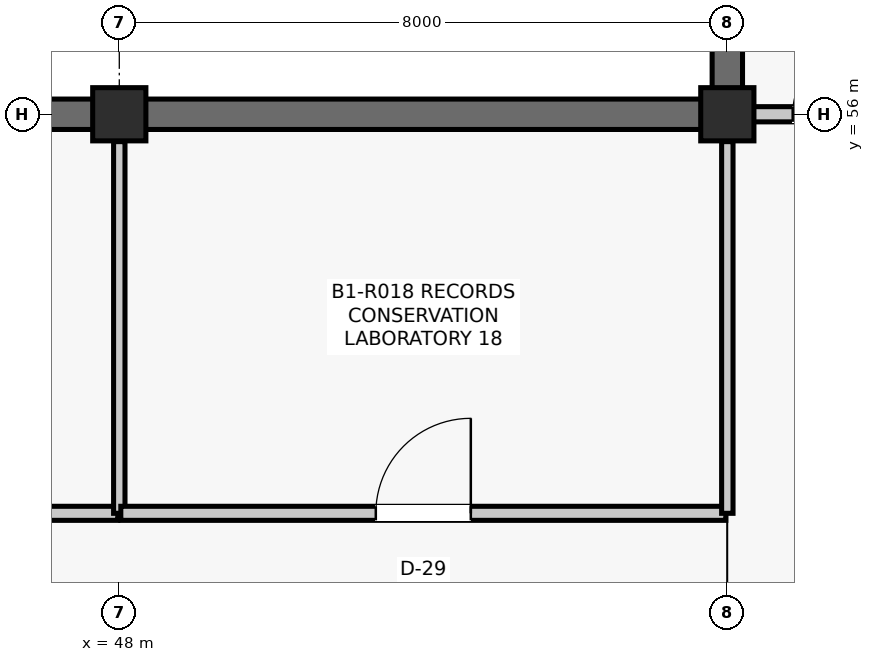
"""IFC4 building model, lengths in metres.
Left out: names, types, materials, properties, quantities, classifications, styles, units other than length and angle.
Written with IfcOpenShell. Run it as: python <this file> out.ifc"""

import sys

from ifc_helpers import new_model, si_unit, direction, frame, frame_2d, origin, origin_2d, place, context, subcontext, project, spatial, rectangle, extrude, element, fill, save


model = new_model("IFC4")
c1 = context("Model", 3, precision=1e-05, world=origin(), true_north=direction((0.0, 1.0)))
c2 = subcontext(c1, "Body", "Model", "MODEL_VIEW")
j1 = project(units=[si_unit("LENGTHUNIT", "METRE"), si_unit("PLANEANGLEUNIT", "RADIAN")], contexts=[c1])
p1 = place(None, origin())
s1 = spatial("IfcSite", under=j1, at=p1, CompositionType="ELEMENT")
p2 = place(p1, origin())
s2 = spatial("IfcBuilding", under=s1, at=p2, CompositionType="ELEMENT")
p3 = place(p2, frame((0.0, 0.0, -4.29)))
s3 = spatial("IfcBuildingStorey", under=s2, at=p3, CompositionType="ELEMENT", Elevation=-4.29)
for number, where, z_axis, x_axis in (
    (1, (48.0, 56.0, 0.0), (0.0, 0.0, 1.0), (1.0, 0.0, 0.0)),
    (2, (56.0, 56.0, 0.0), (0.0, 0.0, 1.0), (1.0, 0.0, 0.0)),
):
    element("IfcColumn", number, at=place(p3, frame(where, z_axis=z_axis, x_axis=x_axis)), inside=s3, PredefinedType="COLUMN", context=c2, shape_type="SweptSolid", body=[
        extrude(rectangle(XDim=0.7, YDim=0.7, at=origin_2d()), origin(), (0.0, 0.0, 1.0), 4.29),
    ])
p4 = place(p3, frame((40.335, 56.0, 0.0), z_axis=(0.0, 0.0, 1.0), x_axis=(1.0, 0.0, 0.0)))
e3 = element("IfcWall", 3, at=p4, inside=s3, PredefinedType="SHEAR", context=c2, shape_type="SweptSolid", body=[
    extrude(rectangle(XDim=7.33, YDim=0.4, at=frame_2d((3.665, 0.0))), origin(), (0.0, 0.0, 1.0), 3.667),
])
p5 = place(p3, frame((48.335, 56.0, 0.0), z_axis=(0.0, 0.0, 1.0), x_axis=(1.0, 0.0, 0.0)))
e4 = element("IfcWall", 4, at=p5, inside=s3, PredefinedType="SHEAR", context=c2, shape_type="SweptSolid", body=[
    extrude(rectangle(XDim=7.33, YDim=0.4, at=frame_2d((3.665, 0.0))), origin(), (0.0, 0.0, 1.0), 3.6),
])
p6 = place(p3, frame((56.0, 56.335, 0.0), z_axis=(0.0, 0.0, 1.0), x_axis=(0.0, 1.0, 0.0)))
e5 = element("IfcWall", 5, at=p6, inside=s3, PredefinedType="SHEAR", context=c2, shape_type="SweptSolid", body=[
    extrude(rectangle(XDim=7.33, YDim=0.4, at=frame_2d((3.665, 0.0))), origin(), (0.0, 0.0, 1.0), 3.664),
])
p7 = place(p3, frame((40.02, 50.75, 0.0), z_axis=(0.0, 0.0, 1.0), x_axis=(1.0, 0.0, 0.0)))
e6 = element("IfcWall", 6, at=p7, inside=s3, PredefinedType="PARTITIONING", context=c2, shape_type="SweptSolid", body=[
    extrude(rectangle(XDim=7.96, YDim=0.185, at=frame_2d((3.98, 0.0))), origin(), (0.0, 0.0, 1.0), 3.393),
])
p8 = place(p7, frame((3.5, 0.0, 0.0)))
e7 = element("IfcOpeningElement", 7, at=p8, cuts=e6, PredefinedType="OPENING", context=c2, shape_type="SweptSolid", body=[
    extrude(rectangle(XDim=0.96, YDim=2.14, at=frame_2d((0.48, 1.07))), frame((0.0, 0.103, 0.0), z_axis=(0.0, -1.0, 0.0), x_axis=(1.0, 0.0, 0.0)), (0.0, 0.0, 1.0), 0.205),
])
p9 = place(p3, frame((48.0, 50.75, 0.0), z_axis=(0.0, 0.0, 1.0), x_axis=(0.0, 1.0, 0.0)))
e8 = element("IfcWall", 8, at=p9, inside=s3, PredefinedType="PARTITIONING", context=c2, shape_type="SweptSolid", body=[
    extrude(rectangle(XDim=4.89, YDim=0.15, at=frame_2d((2.445, 0.0))), origin(), (0.0, 0.0, 1.0), 3.393),
])
p10 = place(p3, frame((48.02, 50.75, 0.0), z_axis=(0.0, 0.0, 1.0), x_axis=(1.0, 0.0, 0.0)))
e9 = element("IfcWall", 9, at=p10, inside=s3, PredefinedType="PARTITIONING", context=c2, shape_type="SweptSolid", body=[
    extrude(rectangle(XDim=7.96, YDim=0.185, at=frame_2d((3.98, 0.0))), origin(), (0.0, 0.0, 1.0), 3.393),
])
p11 = place(p10, frame((3.355, 0.0, 0.0)))
e10 = element("IfcOpeningElement", 10, at=p11, cuts=e9, PredefinedType="OPENING", context=c2, shape_type="SweptSolid", body=[
    extrude(rectangle(XDim=1.25, YDim=2.18, at=frame_2d((0.625, 1.09))), frame((0.0, 0.103, 0.0), z_axis=(0.0, -1.0, 0.0), x_axis=(1.0, 0.0, 0.0)), (0.0, 0.0, 1.0), 0.205),
])
p12 = place(p3, frame((56.0, 50.75, 0.0), z_axis=(0.0, 0.0, 1.0), x_axis=(0.0, 1.0, 0.0)))
e11 = element("IfcWall", 11, at=p12, inside=s3, PredefinedType="PARTITIONING", context=c2, shape_type="SweptSolid", body=[
    extrude(rectangle(XDim=4.89, YDim=0.15, at=frame_2d((2.445, 0.0))), origin(), (0.0, 0.0, 1.0), 3.402),
])
p13 = place(p3, frame((56.34, 56.0, 0.0), z_axis=(0.0, 0.0, 1.0), x_axis=(1.0, 0.0, 0.0)))
e12 = element("IfcWall", 12, at=p13, inside=s3, PredefinedType="PARTITIONING", context=c2, shape_type="SweptSolid", body=[
    extrude(rectangle(XDim=7.27, YDim=0.2, at=frame_2d((3.635, 0.0))), origin(), (0.0, 0.0, 1.0), 3.326),
])
p14 = place(p13, frame((0.52, 0.0, 0.0)))
e13 = element("IfcOpeningElement", 13, at=p14, cuts=e12, PredefinedType="OPENING", context=c2, shape_type="SweptSolid", body=[
    extrude(rectangle(XDim=0.94, YDim=2.12, at=frame_2d((0.47, 1.06))), frame((0.0, 0.11, 0.0), z_axis=(0.0, -1.0, 0.0), x_axis=(1.0, 0.0, 0.0)), (0.0, 0.0, 1.0), 0.22),
])
p15 = place(p11, origin())
e14 = element("IfcDoor", 14, at=p15, inside=s3, OperationType="SINGLE_SWING_RIGHT", PredefinedType="DOOR", context=c2, shape_type="SweptSolid", body=[
    extrude(rectangle(XDim=1.25, YDim=2.18, at=frame_2d((0.625, 1.09))), frame((0.0, 0.025, 0.0), z_axis=(0.0, -1.0, 0.0), x_axis=(1.0, 0.0, 0.0)), (0.0, 0.0, 1.0), 0.05),
])
fill(e10, e14)
p16 = place(p14, origin())
e15 = element("IfcDoor", 15, at=p16, inside=s3, OperationType="SINGLE_SWING_RIGHT", PredefinedType="DOOR", context=c2, shape_type="SweptSolid", body=[
    extrude(rectangle(XDim=0.94, YDim=2.12, at=frame_2d((0.47, 1.06))), frame((0.0, 0.025, 0.0), z_axis=(0.0, -1.0, 0.0), x_axis=(1.0, 0.0, 0.0)), (0.0, 0.0, 1.0), 0.05),
])
fill(e13, e15)
save(model, sys.argv[1])
